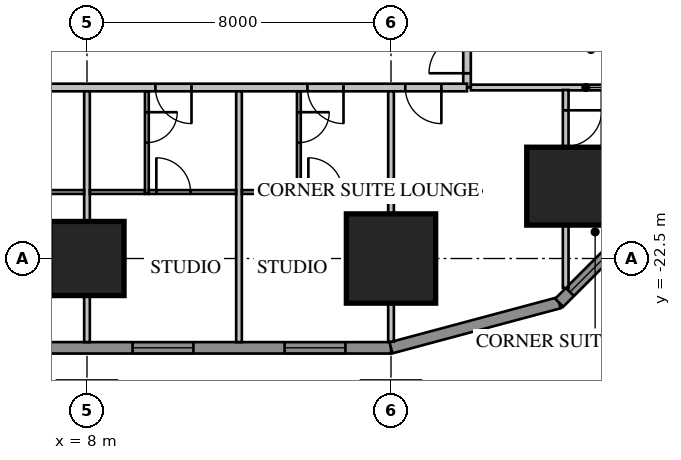
"""IFC4 building model, lengths in metres.
Left out: names, types, materials, properties, quantities, classifications, styles, units other than length and angle.
Written with IfcOpenShell. Run it as: python <this file> out.ifc"""

import sys

from ifc_helpers import new_model, si_unit, direction, frame, frame_2d, origin, origin_2d, place, context, subcontext, project, spatial, rectangle, extrude, element, fill, save


model = new_model("IFC4")
c1 = context("Model", 3, precision=1e-05, world=origin(), true_north=direction((0.0, 1.0)))
c2 = subcontext(c1, "Body", "Model", "MODEL_VIEW")
j1 = project(units=[si_unit("LENGTHUNIT", "METRE"), si_unit("PLANEANGLEUNIT", "RADIAN")], contexts=[c1])
p1 = place(None, origin())
s1 = spatial("IfcSite", under=j1, at=p1, CompositionType="ELEMENT")
p2 = place(p1, origin())
s2 = spatial("IfcBuilding", under=s1, at=p2, CompositionType="ELEMENT")
p3 = place(p2, frame((0.0, 0.0, 23.7)))
s3 = spatial("IfcBuildingStorey", under=s2, at=p3, CompositionType="ELEMENT", Elevation=23.7)
p4 = place(p3, frame((8.0, -22.5, 0.0), z_axis=(0.0, 0.0, 1.0), x_axis=(1.0, 0.0, 0.0)))
e1 = element("IfcColumn", 1, at=p4, inside=s3, PredefinedType="COLUMN", context=c2, shape_type="SweptSolid", body=[
    extrude(rectangle(XDim=1.95, YDim=1.95, at=origin_2d()), origin(), (0.0, 0.0, 1.0), 3.85),
])
p5 = place(p3, frame((16.0, -22.5, 0.0), z_axis=(0.0, 0.0, 1.0), x_axis=(1.0, 0.0, 0.0)))
e2 = element("IfcColumn", 2, at=p5, inside=s3, PredefinedType="COLUMN", context=c2, shape_type="SweptSolid", body=[
    extrude(rectangle(XDim=2.35, YDim=2.35, at=origin_2d()), origin(), (0.0, 0.0, 1.0), 3.85),
])
p6 = place(p3, frame((20.596, -20.596, 0.0), z_axis=(0.0, 0.0, 1.0), x_axis=(1.0, 0.0, 0.0)))
e3 = element("IfcColumn", 3, at=p6, inside=s3, PredefinedType="COLUMN", context=c2, shape_type="SweptSolid", body=[
    extrude(rectangle(XDim=2.05, YDim=2.05, at=origin_2d()), origin(), (0.0, 0.0, 1.0), 3.85),
])
p7 = place(p3, frame((-16.0, -24.85, 0.0), z_axis=(0.0, 0.0, 1.0), x_axis=(1.0, 0.0, 0.0)))
e4 = element("IfcWall", 4, at=p7, inside=s3, PredefinedType="SOLIDWALL", context=c2, shape_type="SweptSolid", body=[
    extrude(rectangle(XDim=32.0, YDim=0.3, at=frame_2d((16.0, 0.0))), origin(), (0.0, 0.0, 1.0), 3.65),
])
p8 = place(p7, frame((1.2, 0.0, 0.75)))
e5 = element("IfcOpeningElement", 5, at=p8, cuts=e4, PredefinedType="OPENING", context=c2, shape_type="SweptSolid", body=[
    extrude(rectangle(XDim=1.6, YDim=1.8, at=frame_2d((0.8, 0.9))), frame((0.0, 0.17, 0.0), z_axis=(0.0, -1.0, 0.0), x_axis=(1.0, 0.0, 0.0)), (0.0, 0.0, 1.0), 0.34),
])
p9 = place(p7, frame((5.2, 0.0, 0.75)))
e6 = element("IfcOpeningElement", 6, at=p9, cuts=e4, PredefinedType="OPENING", context=c2, shape_type="SweptSolid", body=[
    extrude(rectangle(XDim=1.6, YDim=1.8, at=frame_2d((0.8, 0.9))), frame((0.0, 0.17, 0.0), z_axis=(0.0, -1.0, 0.0), x_axis=(1.0, 0.0, 0.0)), (0.0, 0.0, 1.0), 0.34),
])
p10 = place(p7, frame((17.2, 0.0, 0.75)))
e7 = element("IfcOpeningElement", 7, at=p10, cuts=e4, PredefinedType="OPENING", context=c2, shape_type="SweptSolid", body=[
    extrude(rectangle(XDim=1.6, YDim=1.8, at=frame_2d((0.8, 0.9))), frame((0.0, 0.17, 0.0), z_axis=(0.0, -1.0, 0.0), x_axis=(1.0, 0.0, 0.0)), (0.0, 0.0, 1.0), 0.34),
])
p11 = place(p7, frame((21.2, 0.0, 0.75)))
e8 = element("IfcOpeningElement", 8, at=p11, cuts=e4, PredefinedType="OPENING", context=c2, shape_type="SweptSolid", body=[
    extrude(rectangle(XDim=1.6, YDim=1.8, at=frame_2d((0.8, 0.9))), frame((0.0, 0.17, 0.0), z_axis=(0.0, -1.0, 0.0), x_axis=(1.0, 0.0, 0.0)), (0.0, 0.0, 1.0), 0.34),
])
p12 = place(p7, frame((25.2, 0.0, 0.75)))
e9 = element("IfcOpeningElement", 9, at=p12, cuts=e4, PredefinedType="OPENING", context=c2, shape_type="SweptSolid", body=[
    extrude(rectangle(XDim=1.6, YDim=1.8, at=frame_2d((0.8, 0.9))), frame((0.0, 0.17, 0.0), z_axis=(0.0, -1.0, 0.0), x_axis=(1.0, 0.0, 0.0)), (0.0, 0.0, 1.0), 0.34),
])
p13 = place(p7, frame((29.2, 0.0, 0.75)))
e10 = element("IfcOpeningElement", 10, at=p13, cuts=e4, PredefinedType="OPENING", context=c2, shape_type="SweptSolid", body=[
    extrude(rectangle(XDim=1.6, YDim=1.8, at=frame_2d((0.8, 0.9))), frame((0.0, 0.17, 0.0), z_axis=(0.0, -1.0, 0.0), x_axis=(1.0, 0.0, 0.0)), (0.0, 0.0, 1.0), 0.34),
])
p14 = place(p7, frame((8.8, 0.0, 0.75)))
e11 = element("IfcOpeningElement", 11, at=p14, cuts=e4, PredefinedType="OPENING", context=c2, shape_type="SweptSolid", body=[
    extrude(rectangle(XDim=2.4, YDim=1.8, at=frame_2d((1.2, 0.9))), frame((0.0, 0.17, 0.0), z_axis=(0.0, -1.0, 0.0), x_axis=(1.0, 0.0, 0.0)), (0.0, 0.0, 1.0), 0.34),
])
p15 = place(p7, frame((13.812, 0.0, 0.0)))
e12 = element("IfcOpeningElement", 12, at=p15, cuts=e4, PredefinedType="OPENING", context=c2, shape_type="SweptSolid", body=[
    extrude(rectangle(XDim=1.0, YDim=2.4, at=frame_2d((0.5, 1.2))), frame((0.0, 0.17, 0.0), z_axis=(0.0, -1.0, 0.0), x_axis=(1.0, 0.0, 0.0)), (0.0, 0.0, 1.0), 0.34),
])
p16 = place(p3, frame((16.0, -24.85, 0.0), z_axis=(0.0, 0.0, 1.0), x_axis=(0.965920218567, 0.258839972501, 0.0)))
e13 = element("IfcWall", 13, at=p16, inside=s3, PredefinedType="SOLIDWALL", context=c2, shape_type="SweptSolid", body=[
    extrude(rectangle(XDim=4.581, YDim=0.3, at=frame_2d((2.291, 0.0))), origin(), (0.0, 0.0, 1.0), 3.65),
])
p17 = place(p3, frame((20.425, -23.664, 0.0), z_axis=(0.0, 0.0, 1.0), x_axis=(0.707106781187, 0.707106781187, 0.0)))
e14 = element("IfcWall", 14, at=p17, inside=s3, PredefinedType="SOLIDWALL", context=c2, shape_type="SweptSolid", body=[
    extrude(rectangle(XDim=4.581, YDim=0.3, at=frame_2d((2.291, 0.0))), origin(), (0.0, 0.0, 1.0), 3.65),
])
p18 = place(p17, frame((0.4, 0.0, 0.75)))
e15 = element("IfcOpeningElement", 15, at=p18, cuts=e14, PredefinedType="OPENING", context=c2, shape_type="SweptSolid", body=[
    extrude(rectangle(XDim=3.781, YDim=1.8, at=frame_2d((1.891, 0.9))), frame((0.0, 0.17, 0.0), z_axis=(0.0, -1.0, 0.0), x_axis=(1.0, 0.0, 0.0)), (0.0, 0.0, 1.0), 0.34),
])
p19 = place(p3, frame((18.0, -18.0, 0.0), z_axis=(0.0, 0.0, 1.0), x_axis=(0.0, 1.0, 0.0)))
e16 = element("IfcWall", 16, at=p19, inside=s3, PredefinedType="PARTITIONING", context=c2, shape_type="SweptSolid", body=[
    extrude(rectangle(XDim=36.0, YDim=0.2, at=frame_2d((18.0, 0.0))), origin(), (0.0, 0.0, 1.0), 3.65),
])
p20 = place(p19, frame((10.4, 0.0, 0.0)))
e17 = element("IfcOpeningElement", 17, at=p20, cuts=e16, PredefinedType="OPENING", context=c2, shape_type="SweptSolid", body=[
    extrude(rectangle(XDim=1.0, YDim=2.1, at=frame_2d((0.5, 1.05))), frame((0.0, 0.12, 0.0), z_axis=(0.0, -1.0, 0.0), x_axis=(1.0, 0.0, 0.0)), (0.0, 0.0, 1.0), 0.24),
])
p21 = place(p19, frame((0.375, 0.0, 0.0)))
e18 = element("IfcOpeningElement", 18, at=p21, cuts=e16, PredefinedType="OPENING", context=c2, shape_type="SweptSolid", body=[
    extrude(rectangle(XDim=1.0, YDim=2.1, at=frame_2d((0.5, 1.05))), frame((0.0, 0.12, 0.0), z_axis=(0.0, -1.0, 0.0), x_axis=(1.0, 0.0, 0.0)), (0.0, 0.0, 1.0), 0.24),
])
p22 = place(p19, frame((34.375, 0.0, 0.0)))
e19 = element("IfcOpeningElement", 19, at=p22, cuts=e16, PredefinedType="OPENING", context=c2, shape_type="SweptSolid", body=[
    extrude(rectangle(XDim=0.95, YDim=2.1, at=frame_2d((0.475, 1.05))), frame((0.0, 0.12, 0.0), z_axis=(0.0, -1.0, 0.0), x_axis=(1.0, 0.0, 0.0)), (0.0, 0.0, 1.0), 0.24),
])
p23 = place(p3, frame((18.1, -18.0, 0.0), z_axis=(0.0, 0.0, 1.0), x_axis=(1.0, 0.0, 0.0)))
e20 = element("IfcWall", 20, at=p23, inside=s3, PredefinedType="PARTITIONING", context=c2, shape_type="SweptSolid", body=[
    extrude(rectangle(XDim=6.053, YDim=0.15, at=frame_2d((3.027, 0.0))), origin(), (0.0, 0.0, 1.0), 3.65),
])
p24 = place(p3, frame((-18.0, -18.0, 0.0), z_axis=(0.0, 0.0, 1.0), x_axis=(1.0, 0.0, 0.0)))
e21 = element("IfcWall", 21, at=p24, inside=s3, PredefinedType="PARTITIONING", context=c2, shape_type="SweptSolid", body=[
    extrude(rectangle(XDim=36.0, YDim=0.2, at=frame_2d((18.0, 0.0))), origin(), (0.0, 0.0, 1.0), 3.65),
])
p25 = place(p24, frame((0.375, 0.0, 0.0)))
e22 = element("IfcOpeningElement", 22, at=p25, cuts=e21, PredefinedType="OPENING", context=c2, shape_type="SweptSolid", body=[
    extrude(rectangle(XDim=1.0, YDim=2.1, at=frame_2d((0.5, 1.05))), frame((0.0, 0.12, 0.0), z_axis=(0.0, -1.0, 0.0), x_axis=(1.0, 0.0, 0.0)), (0.0, 0.0, 1.0), 0.24),
])
p26 = place(p24, frame((2.45, 0.0, 0.0)))
e23 = element("IfcOpeningElement", 23, at=p26, cuts=e21, PredefinedType="OPENING", context=c2, shape_type="SweptSolid", body=[
    extrude(rectangle(XDim=0.8, YDim=2.1, at=frame_2d((0.4, 1.05))), frame((0.0, 0.12, 0.0), z_axis=(0.0, -1.0, 0.0), x_axis=(1.0, 0.0, 0.0)), (0.0, 0.0, 1.0), 0.24),
])
p27 = place(p24, frame((4.05, 0.0, 0.0)))
e24 = element("IfcOpeningElement", 24, at=p27, cuts=e21, PredefinedType="OPENING", context=c2, shape_type="SweptSolid", body=[
    extrude(rectangle(XDim=1.0, YDim=2.1, at=frame_2d((0.5, 1.05))), frame((0.0, 0.12, 0.0), z_axis=(0.0, -1.0, 0.0), x_axis=(1.0, 0.0, 0.0)), (0.0, 0.0, 1.0), 0.24),
])
p28 = place(p24, frame((6.45, 0.0, 0.0)))
e25 = element("IfcOpeningElement", 25, at=p28, cuts=e21, PredefinedType="OPENING", context=c2, shape_type="SweptSolid", body=[
    extrude(rectangle(XDim=0.9, YDim=2.1, at=frame_2d((0.45, 1.05))), frame((0.0, 0.12, 0.0), z_axis=(0.0, -1.0, 0.0), x_axis=(1.0, 0.0, 0.0)), (0.0, 0.0, 1.0), 0.24),
])
p29 = place(p24, frame((8.15, 0.0, 0.0)))
e26 = element("IfcOpeningElement", 26, at=p29, cuts=e21, PredefinedType="OPENING", context=c2, shape_type="SweptSolid", body=[
    extrude(rectangle(XDim=1.0, YDim=2.1, at=frame_2d((0.5, 1.05))), frame((0.0, 0.12, 0.0), z_axis=(0.0, -1.0, 0.0), x_axis=(1.0, 0.0, 0.0)), (0.0, 0.0, 1.0), 0.24),
])
p30 = place(p24, frame((19.8, 0.0, 0.0)))
e27 = element("IfcOpeningElement", 27, at=p30, cuts=e21, PredefinedType="OPENING", context=c2, shape_type="SweptSolid", body=[
    extrude(rectangle(XDim=0.95, YDim=2.1, at=frame_2d((0.475, 1.05))), frame((0.0, 0.12, 0.0), z_axis=(0.0, -1.0, 0.0), x_axis=(1.0, 0.0, 0.0)), (0.0, 0.0, 1.0), 0.24),
])
p31 = place(p24, frame((23.8, 0.0, 0.0)))
e28 = element("IfcOpeningElement", 28, at=p31, cuts=e21, PredefinedType="OPENING", context=c2, shape_type="SweptSolid", body=[
    extrude(rectangle(XDim=0.95, YDim=2.1, at=frame_2d((0.475, 1.05))), frame((0.0, 0.12, 0.0), z_axis=(0.0, -1.0, 0.0), x_axis=(1.0, 0.0, 0.0)), (0.0, 0.0, 1.0), 0.24),
])
p32 = place(p24, frame((27.8, 0.0, 0.0)))
e29 = element("IfcOpeningElement", 29, at=p32, cuts=e21, PredefinedType="OPENING", context=c2, shape_type="SweptSolid", body=[
    extrude(rectangle(XDim=0.95, YDim=2.1, at=frame_2d((0.475, 1.05))), frame((0.0, 0.12, 0.0), z_axis=(0.0, -1.0, 0.0), x_axis=(1.0, 0.0, 0.0)), (0.0, 0.0, 1.0), 0.24),
])
p33 = place(p24, frame((31.8, 0.0, 0.0)))
e30 = element("IfcOpeningElement", 30, at=p33, cuts=e21, PredefinedType="OPENING", context=c2, shape_type="SweptSolid", body=[
    extrude(rectangle(XDim=0.95, YDim=2.1, at=frame_2d((0.475, 1.05))), frame((0.0, 0.12, 0.0), z_axis=(0.0, -1.0, 0.0), x_axis=(1.0, 0.0, 0.0)), (0.0, 0.0, 1.0), 0.24),
])
p34 = place(p24, frame((34.375, 0.0, 0.0)))
e31 = element("IfcOpeningElement", 31, at=p34, cuts=e21, PredefinedType="OPENING", context=c2, shape_type="SweptSolid", body=[
    extrude(rectangle(XDim=0.95, YDim=2.1, at=frame_2d((0.475, 1.05))), frame((0.0, 0.12, 0.0), z_axis=(0.0, -1.0, 0.0), x_axis=(1.0, 0.0, 0.0)), (0.0, 0.0, 1.0), 0.24),
])
p35 = place(p24, frame((11.2, 0.0, 0.0)))
e32 = element("IfcOpeningElement", 32, at=p35, cuts=e21, PredefinedType="OPENING", context=c2, shape_type="SweptSolid", body=[
    extrude(rectangle(XDim=1.0, YDim=2.1, at=frame_2d((0.5, 1.05))), frame((0.0, 0.12, 0.0), z_axis=(0.0, -1.0, 0.0), x_axis=(1.0, 0.0, 0.0)), (0.0, 0.0, 1.0), 0.24),
])
for number, where, z_axis, x_axis in (
    (33, (8.0, -18.1, 0.0), (0.0, 0.0, 1.0), (0.0, -1.0, 0.0)),
    (34, (12.0, -18.1, 0.0), (0.0, 0.0, 1.0), (0.0, -1.0, 0.0)),
):
    element("IfcWall", number, at=place(p3, frame(where, z_axis=z_axis, x_axis=x_axis)), inside=s3, PredefinedType="PARTITIONING", context=c2, shape_type="SweptSolid", body=[
        extrude(rectangle(XDim=6.6, YDim=0.15, at=frame_2d((3.3, 0.0))), origin(), (0.0, 0.0, 1.0), 3.65),
    ])
p36 = place(p3, frame((16.0, -18.1, 0.0), z_axis=(0.0, 0.0, 1.0), x_axis=(0.0, -1.0, 0.0)))
e35 = element("IfcWall", 35, at=p36, inside=s3, PredefinedType="PARTITIONING", context=c2, shape_type="SweptSolid", body=[
    extrude(rectangle(XDim=6.589, YDim=0.15, at=frame_2d((3.295, 0.0))), origin(), (0.0, 0.0, 1.0), 3.65),
])
p37 = place(p3, frame((9.575, -18.1, 0.0), z_axis=(0.0, 0.0, 1.0), x_axis=(0.0, -1.0, 0.0)))
e36 = element("IfcWall", 36, at=p37, inside=s3, PredefinedType="PARTITIONING", context=c2, shape_type="SweptSolid", body=[
    extrude(rectangle(XDim=2.7, YDim=0.1, at=frame_2d((1.35, 0.0))), origin(), (0.0, 0.0, 1.0), 3.65),
])
p38 = place(p37, frame((0.55, 0.0, 0.0)))
e37 = element("IfcOpeningElement", 37, at=p38, cuts=e36, PredefinedType="OPENING", context=c2, shape_type="SweptSolid", body=[
    extrude(rectangle(XDim=0.8, YDim=2.1, at=frame_2d((0.4, 1.05))), frame((0.0, 0.07, 0.0), z_axis=(0.0, -1.0, 0.0), x_axis=(1.0, 0.0, 0.0)), (0.0, 0.0, 1.0), 0.14),
])
p39 = place(p3, frame((8.075, -20.75, 0.0), z_axis=(0.0, 0.0, 1.0), x_axis=(1.0, 0.0, 0.0)))
e38 = element("IfcWall", 38, at=p39, inside=s3, PredefinedType="PARTITIONING", context=c2, shape_type="SweptSolid", body=[
    extrude(rectangle(XDim=1.45, YDim=0.1, at=frame_2d((0.725, 0.0))), origin(), (0.0, 0.0, 1.0), 3.65),
])
p40 = place(p3, frame((13.575, -18.1, 0.0), z_axis=(0.0, 0.0, 1.0), x_axis=(0.0, -1.0, 0.0)))
e39 = element("IfcWall", 39, at=p40, inside=s3, PredefinedType="PARTITIONING", context=c2, shape_type="SweptSolid", body=[
    extrude(rectangle(XDim=2.7, YDim=0.1, at=frame_2d((1.35, 0.0))), origin(), (0.0, 0.0, 1.0), 3.65),
])
p41 = place(p40, frame((0.55, 0.0, 0.0)))
e40 = element("IfcOpeningElement", 40, at=p41, cuts=e39, PredefinedType="OPENING", context=c2, shape_type="SweptSolid", body=[
    extrude(rectangle(XDim=0.8, YDim=2.1, at=frame_2d((0.4, 1.05))), frame((0.0, 0.07, 0.0), z_axis=(0.0, -1.0, 0.0), x_axis=(1.0, 0.0, 0.0)), (0.0, 0.0, 1.0), 0.14),
])
p42 = place(p3, frame((12.075, -20.75, 0.0), z_axis=(0.0, 0.0, 1.0), x_axis=(1.0, 0.0, 0.0)))
e41 = element("IfcWall", 41, at=p42, inside=s3, PredefinedType="PARTITIONING", context=c2, shape_type="SweptSolid", body=[
    extrude(rectangle(XDim=1.45, YDim=0.1, at=frame_2d((0.725, 0.0))), origin(), (0.0, 0.0, 1.0), 3.65),
])
p43 = place(p3, frame((20.596, -18.065, 0.0), z_axis=(0.0, 0.0, 1.0), x_axis=(0.0, -1.0, 0.0)))
e42 = element("IfcWall", 42, at=p43, inside=s3, PredefinedType="PARTITIONING", context=c2, shape_type="SweptSolid", body=[
    extrude(rectangle(XDim=5.209, YDim=0.15, at=frame_2d((2.604, 0.0))), origin(), (0.0, 0.0, 1.0), 3.65),
])
p44 = place(p43, frame((0.535, 0.0, 0.0)))
e43 = element("IfcOpeningElement", 43, at=p44, cuts=e42, PredefinedType="OPENING", context=c2, shape_type="SweptSolid", body=[
    extrude(rectangle(XDim=0.95, YDim=2.1, at=frame_2d((0.475, 1.05))), frame((0.0, 0.095, 0.0), z_axis=(0.0, -1.0, 0.0), x_axis=(1.0, 0.0, 0.0)), (0.0, 0.0, 1.0), 0.19),
])
p45 = place(p3, frame((5.625, -20.75, 0.0), z_axis=(0.0, 0.0, 1.0), x_axis=(1.0, 0.0, 0.0)))
e44 = element("IfcWall", 44, at=p45, inside=s3, PredefinedType="PARTITIONING", context=c2, shape_type="SweptSolid", body=[
    extrude(rectangle(XDim=2.3, YDim=0.1, at=frame_2d((1.15, 0.0))), origin(), (0.0, 0.0, 1.0), 3.65),
])
p46 = place(p45, frame((0.2, 0.0, 0.0)))
e45 = element("IfcOpeningElement", 45, at=p46, cuts=e44, PredefinedType="OPENING", context=c2, shape_type="SweptSolid", body=[
    extrude(rectangle(XDim=0.9, YDim=2.1, at=frame_2d((0.45, 1.05))), frame((0.0, 0.07, 0.0), z_axis=(0.0, -1.0, 0.0), x_axis=(1.0, 0.0, 0.0)), (0.0, 0.0, 1.0), 0.14),
])
p47 = place(p3, frame((9.625, -20.75, 0.0), z_axis=(0.0, 0.0, 1.0), x_axis=(1.0, 0.0, 0.0)))
e46 = element("IfcWall", 46, at=p47, inside=s3, PredefinedType="PARTITIONING", context=c2, shape_type="SweptSolid", body=[
    extrude(rectangle(XDim=2.3, YDim=0.1, at=frame_2d((1.15, 0.0))), origin(), (0.0, 0.0, 1.0), 3.65),
])
p48 = place(p47, frame((0.2, 0.0, 0.0)))
e47 = element("IfcOpeningElement", 47, at=p48, cuts=e46, PredefinedType="OPENING", context=c2, shape_type="SweptSolid", body=[
    extrude(rectangle(XDim=0.9, YDim=2.1, at=frame_2d((0.45, 1.05))), frame((0.0, 0.07, 0.0), z_axis=(0.0, -1.0, 0.0), x_axis=(1.0, 0.0, 0.0)), (0.0, 0.0, 1.0), 0.14),
])
p49 = place(p3, frame((13.625, -20.75, 0.0), z_axis=(0.0, 0.0, 1.0), x_axis=(1.0, 0.0, 0.0)))
e48 = element("IfcWall", 48, at=p49, inside=s3, PredefinedType="PARTITIONING", context=c2, shape_type="SweptSolid", body=[
    extrude(rectangle(XDim=2.3, YDim=0.1, at=frame_2d((1.15, 0.0))), origin(), (0.0, 0.0, 1.0), 3.65),
])
p50 = place(p49, frame((0.2, 0.0, 0.0)))
e49 = element("IfcOpeningElement", 49, at=p50, cuts=e48, PredefinedType="OPENING", context=c2, shape_type="SweptSolid", body=[
    extrude(rectangle(XDim=0.9, YDim=2.1, at=frame_2d((0.45, 1.05))), frame((0.0, 0.07, 0.0), z_axis=(0.0, -1.0, 0.0), x_axis=(1.0, 0.0, 0.0)), (0.0, 0.0, 1.0), 0.14),
])
p51 = place(p12, origin())
e50 = element("IfcWindow", 50, at=p51, inside=s3, PartitioningType="SINGLE_PANEL", PredefinedType="WINDOW", context=c2, shape_type="SweptSolid", body=[
    extrude(rectangle(XDim=1.6, YDim=1.8, at=frame_2d((0.8, 0.9))), frame((0.0, 0.03, 0.0), z_axis=(0.0, -1.0, 0.0), x_axis=(1.0, 0.0, 0.0)), (0.0, 0.0, 1.0), 0.06),
])
fill(e9, e50)
p52 = place(p13, origin())
e51 = element("IfcWindow", 51, at=p52, inside=s3, PartitioningType="SINGLE_PANEL", PredefinedType="WINDOW", context=c2, shape_type="SweptSolid", body=[
    extrude(rectangle(XDim=1.6, YDim=1.8, at=frame_2d((0.8, 0.9))), frame((0.0, 0.03, 0.0), z_axis=(0.0, -1.0, 0.0), x_axis=(1.0, 0.0, 0.0)), (0.0, 0.0, 1.0), 0.06),
])
fill(e10, e51)
p53 = place(p18, origin())
e52 = element("IfcWindow", 52, at=p53, inside=s3, PartitioningType="SINGLE_PANEL", PredefinedType="WINDOW", context=c2, shape_type="SweptSolid", body=[
    extrude(rectangle(XDim=3.781, YDim=1.8, at=frame_2d((1.891, 0.9))), frame((0.0, 0.03, 0.0), z_axis=(0.0, -1.0, 0.0), x_axis=(1.0, 0.0, 0.0)), (0.0, 0.0, 1.0), 0.06),
])
fill(e15, e52)
p54 = place(p21, origin())
e53 = element("IfcDoor", 53, at=p54, inside=s3, OperationType="SINGLE_SWING_LEFT", PredefinedType="DOOR", context=c2, shape_type="SweptSolid", body=[
    extrude(rectangle(XDim=1.0, YDim=2.1, at=frame_2d((0.5, 1.05))), frame((0.0, 0.025, 0.0), z_axis=(0.0, -1.0, 0.0), x_axis=(1.0, 0.0, 0.0)), (0.0, 0.0, 1.0), 0.05),
])
fill(e18, e53)
p55 = place(p32, origin())
e54 = element("IfcDoor", 54, at=p55, inside=s3, OperationType="SINGLE_SWING_RIGHT", PredefinedType="DOOR", context=c2, shape_type="SweptSolid", body=[
    extrude(rectangle(XDim=0.95, YDim=2.1, at=frame_2d((0.475, 1.05))), frame((0.0, 0.025, 0.0), z_axis=(0.0, -1.0, 0.0), x_axis=(1.0, 0.0, 0.0)), (0.0, 0.0, 1.0), 0.05),
])
fill(e29, e54)
p56 = place(p38, origin())
e55 = element("IfcDoor", 55, at=p56, inside=s3, OperationType="SINGLE_SWING_LEFT", PredefinedType="DOOR", context=c2, shape_type="SweptSolid", body=[
    extrude(rectangle(XDim=0.8, YDim=2.1, at=frame_2d((0.4, 1.05))), frame((0.0, 0.025, 0.0), z_axis=(0.0, -1.0, 0.0), x_axis=(1.0, 0.0, 0.0)), (0.0, 0.0, 1.0), 0.05),
])
fill(e37, e55)
p57 = place(p33, origin())
e56 = element("IfcDoor", 56, at=p57, inside=s3, OperationType="SINGLE_SWING_RIGHT", PredefinedType="DOOR", context=c2, shape_type="SweptSolid", body=[
    extrude(rectangle(XDim=0.95, YDim=2.1, at=frame_2d((0.475, 1.05))), frame((0.0, 0.025, 0.0), z_axis=(0.0, -1.0, 0.0), x_axis=(1.0, 0.0, 0.0)), (0.0, 0.0, 1.0), 0.05),
])
fill(e30, e56)
p58 = place(p41, origin())
e57 = element("IfcDoor", 57, at=p58, inside=s3, OperationType="SINGLE_SWING_LEFT", PredefinedType="DOOR", context=c2, shape_type="SweptSolid", body=[
    extrude(rectangle(XDim=0.8, YDim=2.1, at=frame_2d((0.4, 1.05))), frame((0.0, 0.025, 0.0), z_axis=(0.0, -1.0, 0.0), x_axis=(1.0, 0.0, 0.0)), (0.0, 0.0, 1.0), 0.05),
])
fill(e40, e57)
p59 = place(p34, origin())
e58 = element("IfcDoor", 58, at=p59, inside=s3, OperationType="SINGLE_SWING_RIGHT", PredefinedType="DOOR", context=c2, shape_type="SweptSolid", body=[
    extrude(rectangle(XDim=0.95, YDim=2.1, at=frame_2d((0.475, 1.05))), frame((0.0, 0.025, 0.0), z_axis=(0.0, -1.0, 0.0), x_axis=(1.0, 0.0, 0.0)), (0.0, 0.0, 1.0), 0.05),
])
fill(e31, e58)
p60 = place(p44, origin())
e59 = element("IfcDoor", 59, at=p60, inside=s3, OperationType="SINGLE_SWING_LEFT", PredefinedType="DOOR", context=c2, shape_type="SweptSolid", body=[
    extrude(rectangle(XDim=0.95, YDim=2.1, at=frame_2d((0.475, 1.05))), frame((0.0, 0.025, 0.0), z_axis=(0.0, -1.0, 0.0), x_axis=(1.0, 0.0, 0.0)), (0.0, 0.0, 1.0), 0.05),
])
fill(e43, e59)
p61 = place(p48, origin())
e60 = element("IfcDoor", 60, at=p61, inside=s3, OperationType="SINGLE_SWING_LEFT", PredefinedType="DOOR", context=c2, shape_type="SweptSolid", body=[
    extrude(rectangle(XDim=0.9, YDim=2.1, at=frame_2d((0.45, 1.05))), frame((0.0, 0.025, 0.0), z_axis=(0.0, -1.0, 0.0), x_axis=(1.0, 0.0, 0.0)), (0.0, 0.0, 1.0), 0.05),
])
fill(e47, e60)
p62 = place(p50, origin())
e61 = element("IfcDoor", 61, at=p62, inside=s3, OperationType="SINGLE_SWING_LEFT", PredefinedType="DOOR", context=c2, shape_type="SweptSolid", body=[
    extrude(rectangle(XDim=0.9, YDim=2.1, at=frame_2d((0.45, 1.05))), frame((0.0, 0.025, 0.0), z_axis=(0.0, -1.0, 0.0), x_axis=(1.0, 0.0, 0.0)), (0.0, 0.0, 1.0), 0.05),
])
fill(e49, e61)
save(model, sys.argv[1])
